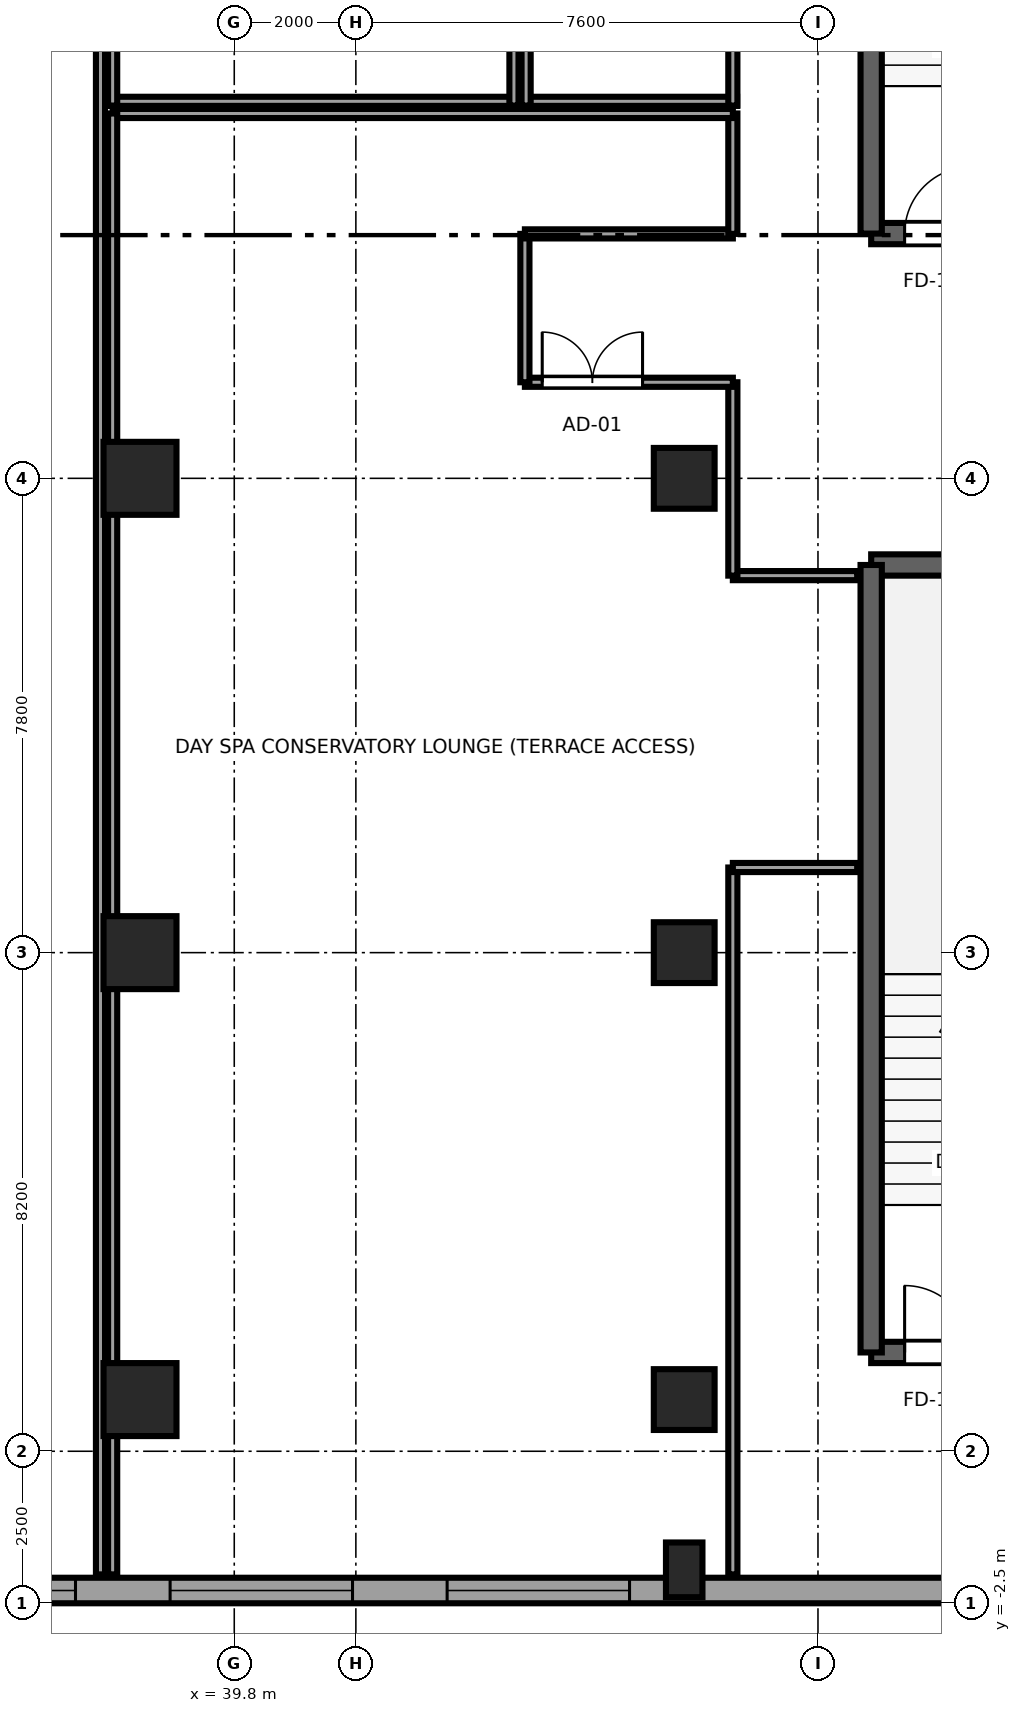
"""IFC4 building model, lengths in metres.
Left out: names, types, materials, properties, quantities, classifications, styles, units other than length and angle.
Written with IfcOpenShell. Run it as: python <this file> out.ifc"""

import sys

from ifc_helpers import new_model, si_unit, direction, frame, frame_2d, origin, origin_2d, place, context, subcontext, project, spatial, rectangle, extrude, source, transform, mapped, element, fill, save


model = new_model("IFC4")
c1 = context("Model", 3, precision=1e-05, world=origin(), true_north=direction((0.0, 1.0)))
c2 = subcontext(c1, "Body", "Model", "MODEL_VIEW")
j1 = project(units=[si_unit("LENGTHUNIT", "METRE"), si_unit("PLANEANGLEUNIT", "RADIAN")], contexts=[c1])
p1 = place(None, origin())
s1 = spatial("IfcSite", under=j1, at=p1, CompositionType="ELEMENT")
p2 = place(p1, origin())
s2 = spatial("IfcBuilding", under=s1, at=p2, CompositionType="ELEMENT")
p3 = place(p2, frame((0.0, 0.0, 26.8)))
s3 = spatial("IfcBuildingStorey", under=s2, at=p3, CompositionType="ELEMENT", Elevation=26.8)
p4 = place(p3, frame((50.275, 1.625, 0.0), z_axis=(0.0, 0.0, 1.0), x_axis=(1.0, 0.0, 0.0)))
e1 = element("IfcWall", 1, at=p4, inside=s3, PredefinedType="SHEAR", context=c2, shape_type="SweptSolid", body=[
    extrude(rectangle(XDim=5.0, YDim=0.35, at=frame_2d((2.5, 0.0))), origin(), (0.0, 0.0, 1.0), 5.2),
])
p5 = place(p4, frame((0.55, 0.0, 0.0)))
e2 = element("IfcOpeningElement", 2, at=p5, cuts=e1, PredefinedType="OPENING", context=c2, shape_type="SweptSolid", body=[
    extrude(rectangle(XDim=1.1, YDim=2.12, at=frame_2d((0.55, 1.06))), frame((0.0, 0.185, 0.0), z_axis=(0.0, -1.0, 0.0), x_axis=(1.0, 0.0, 0.0)), (0.0, 0.0, 1.0), 0.37),
])
p6 = place(p3, frame((55.275, 14.575, 0.0), z_axis=(0.0, 0.0, 1.0), x_axis=(-1.0, 0.0, 0.0)))
e3 = element("IfcWall", 3, at=p6, inside=s3, PredefinedType="SHEAR", context=c2, shape_type="SweptSolid", body=[
    extrude(rectangle(XDim=5.0, YDim=0.35, at=frame_2d((2.5, 0.0))), origin(), (0.0, 0.0, 1.0), 5.2),
])
p7 = place(p3, frame((50.275, 14.575, 0.0), z_axis=(0.0, 0.0, 1.0), x_axis=(0.0, -1.0, 0.0)))
e4 = element("IfcWall", 4, at=p7, inside=s3, PredefinedType="SHEAR", context=c2, shape_type="SweptSolid", body=[
    extrude(rectangle(XDim=12.95, YDim=0.35, at=frame_2d((6.475, 0.0))), origin(), (0.0, 0.0, 1.0), 5.2),
])
p8 = place(p3, frame((50.275, 20.025, 0.0), z_axis=(0.0, 0.0, 1.0), x_axis=(1.0, 0.0, 0.0)))
e5 = element("IfcWall", 5, at=p8, inside=s3, PredefinedType="SHEAR", context=c2, shape_type="SweptSolid", body=[
    extrude(rectangle(XDim=5.0, YDim=0.35, at=frame_2d((2.5, 0.0))), origin(), (0.0, 0.0, 1.0), 5.2),
])
p9 = place(p8, frame((0.55, 0.0, 0.0)))
e6 = element("IfcOpeningElement", 6, at=p9, cuts=e5, PredefinedType="OPENING", context=c2, shape_type="SweptSolid", body=[
    extrude(rectangle(XDim=1.1, YDim=2.12, at=frame_2d((0.55, 1.06))), frame((0.0, 0.185, 0.0), z_axis=(0.0, -1.0, 0.0), x_axis=(1.0, 0.0, 0.0)), (0.0, 0.0, 1.0), 0.37),
])
p10 = place(p3, frame((50.275, 32.975, 0.0), z_axis=(0.0, 0.0, 1.0), x_axis=(0.0, -1.0, 0.0)))
e7 = element("IfcWall", 7, at=p10, inside=s3, PredefinedType="SHEAR", context=c2, shape_type="SweptSolid", body=[
    extrude(rectangle(XDim=12.95, YDim=0.35, at=frame_2d((6.475, 0.0))), origin(), (0.0, 0.0, 1.0), 5.2),
])
m1 = source(origin(), c2, "Body", "SweptSolid", [
    extrude(rectangle(XDim=1.2, YDim=1.2, at=origin_2d()), origin(), (0.0, 0.0, 1.0), 5.2),
])
for number, where, z_axis, x_axis in (
    (8, (38.25, 0.85, 0.0), (0.0, 0.0, 1.0), (1.0, 0.0, 0.0)),
    (9, (38.25, 8.2, 0.0), (0.0, 0.0, 1.0), (1.0, 0.0, 0.0)),
    (10, (38.25, 16.0, 0.0), (0.0, 0.0, 1.0), (1.0, 0.0, 0.0)),
):
    element("IfcColumn", number, at=place(p3, frame(where, z_axis=z_axis, x_axis=x_axis)), inside=s3, PredefinedType="COLUMN", context=c2, shape_type="MappedRepresentation", body=[
        mapped(m1, transform((0.0, 0.0, 0.0), x_axis=(1.0, 0.0, 0.0), y_axis=(0.0, 1.0, 0.0), z_axis=(0.0, 0.0, 1.0), scale=1.0)),
    ])
m2 = source(origin(), c2, "Body", "SweptSolid", [
    extrude(rectangle(XDim=1.0, YDim=1.0, at=origin_2d()), origin(), (0.0, 0.0, 1.0), 5.2),
])
for number, where, z_axis, x_axis in (
    (11, (47.2, 0.85, 0.0), (0.0, 0.0, 1.0), (1.0, 0.0, 0.0)),
    (12, (47.2, 8.2, 0.0), (0.0, 0.0, 1.0), (1.0, 0.0, 0.0)),
    (13, (47.2, 16.0, 0.0), (0.0, 0.0, 1.0), (1.0, 0.0, 0.0)),
):
    element("IfcColumn", number, at=place(p3, frame(where, z_axis=z_axis, x_axis=x_axis)), inside=s3, PredefinedType="COLUMN", context=c2, shape_type="MappedRepresentation", body=[
        mapped(m2, transform((0.0, 0.0, 0.0), x_axis=(1.0, 0.0, 0.0), y_axis=(0.0, 1.0, 0.0), z_axis=(0.0, 0.0, 1.0), scale=1.0)),
    ])
m3 = source(origin(), c2, "Body", "SweptSolid", [
    extrude(rectangle(XDim=0.6, YDim=0.9, at=origin_2d()), origin(), (0.0, 0.0, 1.0), 5.2),
])
p11 = place(p3, frame((47.2, -1.95, 0.0), z_axis=(0.0, 0.0, 1.0), x_axis=(1.0, 0.0, 0.0)))
e14 = element("IfcColumn", 14, at=p11, inside=s3, PredefinedType="PILASTER", context=c2, shape_type="MappedRepresentation", body=[
    mapped(m3, transform((0.0, 0.0, 0.0), x_axis=(1.0, 0.0, 0.0), y_axis=(0.0, 1.0, 0.0), z_axis=(0.0, 0.0, 1.0), scale=1.0)),
])
p12 = place(p3, frame((-8.19, -2.29, 0.0), z_axis=(0.0, 0.0, 1.0), x_axis=(1.0, 0.0, 0.0)))
e15 = element("IfcWall", 15, at=p12, inside=s3, PredefinedType="SOLIDWALL", context=c2, shape_type="SweptSolid", body=[
    extrude(rectangle(XDim=64.98, YDim=0.42, at=frame_2d((32.49, 0.0))), origin(), (0.0, 0.0, 1.0), 4.94),
])
p13 = place(p12, frame((1.378, 0.0, 0.65)))
e16 = element("IfcOpeningElement", 16, at=p13, cuts=e15, PredefinedType="OPENING", context=c2, shape_type="SweptSolid", body=[
    extrude(rectangle(XDim=3.0, YDim=2.5, at=frame_2d((1.5, 1.25))), frame((0.0, 0.22, 0.0), z_axis=(0.0, -1.0, 0.0), x_axis=(1.0, 0.0, 0.0)), (0.0, 0.0, 1.0), 0.44),
])
p14 = place(p12, frame((4.884, 0.0, 0.65)))
e17 = element("IfcOpeningElement", 17, at=p14, cuts=e15, PredefinedType="OPENING", context=c2, shape_type="SweptSolid", body=[
    extrude(rectangle(XDim=3.0, YDim=2.5, at=frame_2d((1.5, 1.25))), frame((0.0, 0.22, 0.0), z_axis=(0.0, -1.0, 0.0), x_axis=(1.0, 0.0, 0.0)), (0.0, 0.0, 1.0), 0.44),
])
p15 = place(p12, frame((10.489, 0.0, 0.65)))
e18 = element("IfcOpeningElement", 18, at=p15, cuts=e15, PredefinedType="OPENING", context=c2, shape_type="SweptSolid", body=[
    extrude(rectangle(XDim=3.0, YDim=2.5, at=frame_2d((1.5, 1.25))), frame((0.0, 0.22, 0.0), z_axis=(0.0, -1.0, 0.0), x_axis=(1.0, 0.0, 0.0)), (0.0, 0.0, 1.0), 0.44),
])
p16 = place(p12, frame((19.601, 0.0, 0.65)))
e19 = element("IfcOpeningElement", 19, at=p16, cuts=e15, PredefinedType="OPENING", context=c2, shape_type="SweptSolid", body=[
    extrude(rectangle(XDim=3.0, YDim=2.5, at=frame_2d((1.5, 1.25))), frame((0.0, 0.22, 0.0), z_axis=(0.0, -1.0, 0.0), x_axis=(1.0, 0.0, 0.0)), (0.0, 0.0, 1.0), 0.44),
])
p17 = place(p12, frame((28.712, 0.0, 0.65)))
e20 = element("IfcOpeningElement", 20, at=p17, cuts=e15, PredefinedType="OPENING", context=c2, shape_type="SweptSolid", body=[
    extrude(rectangle(XDim=3.0, YDim=2.5, at=frame_2d((1.5, 1.25))), frame((0.0, 0.22, 0.0), z_axis=(0.0, -1.0, 0.0), x_axis=(1.0, 0.0, 0.0)), (0.0, 0.0, 1.0), 0.44),
])
p18 = place(p12, frame((32.718, 0.0, 0.65)))
e21 = element("IfcOpeningElement", 21, at=p18, cuts=e15, PredefinedType="OPENING", context=c2, shape_type="SweptSolid", body=[
    extrude(rectangle(XDim=3.0, YDim=2.5, at=frame_2d((1.5, 1.25))), frame((0.0, 0.22, 0.0), z_axis=(0.0, -1.0, 0.0), x_axis=(1.0, 0.0, 0.0)), (0.0, 0.0, 1.0), 0.44),
])
p19 = place(p12, frame((37.824, 0.0, 0.65)))
e22 = element("IfcOpeningElement", 22, at=p19, cuts=e15, PredefinedType="OPENING", context=c2, shape_type="SweptSolid", body=[
    extrude(rectangle(XDim=3.0, YDim=2.5, at=frame_2d((1.5, 1.25))), frame((0.0, 0.22, 0.0), z_axis=(0.0, -1.0, 0.0), x_axis=(1.0, 0.0, 0.0)), (0.0, 0.0, 1.0), 0.44),
])
p20 = place(p12, frame((42.379, 0.0, 0.65)))
e23 = element("IfcOpeningElement", 23, at=p20, cuts=e15, PredefinedType="OPENING", context=c2, shape_type="SweptSolid", body=[
    extrude(rectangle(XDim=3.0, YDim=2.5, at=frame_2d((1.5, 1.25))), frame((0.0, 0.22, 0.0), z_axis=(0.0, -1.0, 0.0), x_axis=(1.0, 0.0, 0.0)), (0.0, 0.0, 1.0), 0.44),
])
p21 = place(p12, frame((46.935, 0.0, 0.65)))
e24 = element("IfcOpeningElement", 24, at=p21, cuts=e15, PredefinedType="OPENING", context=c2, shape_type="SweptSolid", body=[
    extrude(rectangle(XDim=3.0, YDim=2.5, at=frame_2d((1.5, 1.25))), frame((0.0, 0.22, 0.0), z_axis=(0.0, -1.0, 0.0), x_axis=(1.0, 0.0, 0.0)), (0.0, 0.0, 1.0), 0.44),
])
p22 = place(p12, frame((51.491, 0.0, 0.65)))
e25 = element("IfcOpeningElement", 25, at=p22, cuts=e15, PredefinedType="OPENING", context=c2, shape_type="SweptSolid", body=[
    extrude(rectangle(XDim=3.0, YDim=2.5, at=frame_2d((1.5, 1.25))), frame((0.0, 0.22, 0.0), z_axis=(0.0, -1.0, 0.0), x_axis=(1.0, 0.0, 0.0)), (0.0, 0.0, 1.0), 0.44),
])
p23 = place(p12, frame((60.602, 0.0, 0.65)))
e26 = element("IfcOpeningElement", 26, at=p23, cuts=e15, PredefinedType="OPENING", context=c2, shape_type="SweptSolid", body=[
    extrude(rectangle(XDim=3.0, YDim=2.5, at=frame_2d((1.5, 1.25))), frame((0.0, 0.22, 0.0), z_axis=(0.0, -1.0, 0.0), x_axis=(1.0, 0.0, 0.0)), (0.0, 0.0, 1.0), 0.44),
])
p24 = place(p3, frame((37.6, -2.025, 0.0), z_axis=(0.0, 0.0, 1.0), x_axis=(0.0, 1.0, 0.0)))
e27 = element("IfcWall", 27, at=p24, inside=s3, PredefinedType="PARTITIONING", context=c2, shape_type="SweptSolid", body=[
    extrude(rectangle(XDim=29.375, YDim=0.15, at=frame_2d((14.688, 0.0))), origin(), (0.0, 0.0, 1.0), 4.94),
])
p25 = place(p3, frame((48.0, -2.025, 0.0), z_axis=(0.0, 0.0, 1.0), x_axis=(0.0, 1.0, 0.0)))
e28 = element("IfcWall", 28, at=p25, inside=s3, PredefinedType="PARTITIONING", context=c2, shape_type="SweptSolid", body=[
    extrude(rectangle(XDim=11.625, YDim=0.15, at=frame_2d((5.812, 0.0))), origin(), (0.0, 0.0, 1.0), 4.94),
])
for number, where, z_axis, x_axis in (
    (29, (48.0, 9.6, 0.0), (0.0, 0.0, 1.0), (1.0, 0.0, 0.0)),
    (30, (48.0, 14.4, 0.0), (0.0, 0.0, 1.0), (1.0, 0.0, 0.0)),
):
    element("IfcWall", number, at=place(p3, frame(where, z_axis=z_axis, x_axis=x_axis)), inside=s3, PredefinedType="PARTITIONING", context=c2, shape_type="SweptSolid", body=[
        extrude(rectangle(XDim=2.045, YDim=0.15, at=frame_2d((1.022, 0.0))), origin(), (0.0, 0.0, 1.0), 4.94),
    ])
p26 = place(p3, frame((48.0, 14.4, 0.0), z_axis=(0.0, 0.0, 1.0), x_axis=(0.0, 1.0, 0.0)))
e31 = element("IfcWall", 31, at=p26, inside=s3, PredefinedType="PARTITIONING", context=c2, shape_type="SweptSolid", body=[
    extrude(rectangle(XDim=3.18, YDim=0.15, at=frame_2d((1.59, 0.0))), origin(), (0.0, 0.0, 1.0), 4.94),
])
p27 = place(p3, frame((44.58, 17.58, 0.0), z_axis=(0.0, 0.0, 1.0), x_axis=(1.0, 0.0, 0.0)))
e32 = element("IfcWall", 32, at=p27, inside=s3, PredefinedType="PARTITIONING", context=c2, shape_type="SweptSolid", body=[
    extrude(rectangle(XDim=3.42, YDim=0.15, at=frame_2d((1.71, 0.0))), origin(), (0.0, 0.0, 1.0), 4.94),
])
p28 = place(p27, frame((0.285, 0.0, 0.0)))
e33 = element("IfcOpeningElement", 33, at=p28, cuts=e32, PredefinedType="OPENING", context=c2, shape_type="SweptSolid", body=[
    extrude(rectangle(XDim=1.65, YDim=2.15, at=frame_2d((0.825, 1.075))), frame((0.0, 0.085, 0.0), z_axis=(0.0, -1.0, 0.0), x_axis=(1.0, 0.0, 0.0)), (0.0, 0.0, 1.0), 0.17),
])
p29 = place(p3, frame((44.58, 17.58, 0.0), z_axis=(0.0, 0.0, 1.0), x_axis=(0.0, 1.0, 0.0)))
e34 = element("IfcWall", 34, at=p29, inside=s3, PredefinedType="PARTITIONING", context=c2, shape_type="SweptSolid", body=[
    extrude(rectangle(XDim=2.44, YDim=0.15, at=frame_2d((1.22, 0.0))), origin(), (0.0, 0.0, 1.0), 4.94),
])
p30 = place(p3, frame((44.58, 20.02, 0.0), z_axis=(0.0, 0.0, 1.0), x_axis=(1.0, 0.0, 0.0)))
e35 = element("IfcWall", 35, at=p30, inside=s3, PredefinedType="PARTITIONING", context=c2, shape_type="SweptSolid", body=[
    extrude(rectangle(XDim=3.42, YDim=0.15, at=frame_2d((1.71, 0.0))), origin(), (0.0, 0.0, 1.0), 4.94),
])
p31 = place(p3, frame((48.0, 20.02, 0.0), z_axis=(0.0, 0.0, 1.0), x_axis=(0.0, 1.0, 0.0)))
e36 = element("IfcWall", 36, at=p31, inside=s3, PredefinedType="PARTITIONING", context=c2, shape_type="SweptSolid", body=[
    extrude(rectangle(XDim=1.98, YDim=0.15, at=frame_2d((0.99, 0.0))), origin(), (0.0, 0.0, 1.0), 4.94),
])
p32 = place(p3, frame((37.8, 22.0, 0.0), z_axis=(0.0, 0.0, 1.0), x_axis=(1.0, 0.0, 0.0)))
e37 = element("IfcWall", 37, at=p32, inside=s3, PredefinedType="PARTITIONING", context=c2, shape_type="SweptSolid", body=[
    extrude(rectangle(XDim=10.2, YDim=0.15, at=frame_2d((5.1, 0.0))), origin(), (0.0, 0.0, 1.0), 4.94),
])
p33 = place(p3, frame((37.8, -2.025, 0.0), z_axis=(0.0, 0.0, 1.0), x_axis=(0.0, 1.0, 0.0)))
e38 = element("IfcWall", 38, at=p33, inside=s3, PredefinedType="PARTITIONING", context=c2, shape_type="SweptSolid", body=[
    extrude(rectangle(XDim=24.025, YDim=0.15, at=frame_2d((12.012, 0.0))), origin(), (0.0, 0.0, 1.0), 4.94),
])
p34 = place(p3, frame((37.73, 22.2, 0.0), z_axis=(0.0, 0.0, 1.0), x_axis=(1.0, 0.0, 0.0)))
e39 = element("IfcWall", 39, at=p34, inside=s3, PredefinedType="PARTITIONING", context=c2, shape_type="SweptSolid", body=[
    extrude(rectangle(XDim=6.74, YDim=0.15, at=frame_2d((3.37, 0.0))), origin(), (0.0, 0.0, 1.0), 4.94),
])
for number, where, z_axis, x_axis in (
    (40, (37.8, 22.13, 0.0), (0.0, 0.0, 1.0), (0.0, 1.0, 0.0)),
    (41, (44.4, 22.13, 0.0), (0.0, 0.0, 1.0), (0.0, 1.0, 0.0)),
):
    element("IfcWall", number, at=place(p3, frame(where, z_axis=z_axis, x_axis=x_axis)), inside=s3, PredefinedType="PARTITIONING", context=c2, shape_type="SweptSolid", body=[
        extrude(rectangle(XDim=5.29, YDim=0.15, at=frame_2d((2.645, 0.0))), origin(), (0.0, 0.0, 1.0), 4.94),
    ])
p35 = place(p3, frame((44.53, 22.2, 0.0), z_axis=(0.0, 0.0, 1.0), x_axis=(1.0, 0.0, 0.0)))
e42 = element("IfcWall", 42, at=p35, inside=s3, PredefinedType="PARTITIONING", context=c2, shape_type="SweptSolid", body=[
    extrude(rectangle(XDim=3.54, YDim=0.15, at=frame_2d((1.77, 0.0))), origin(), (0.0, 0.0, 1.0), 4.94),
])
for number, where, z_axis, x_axis in (
    (43, (44.6, 22.13, 0.0), (0.0, 0.0, 1.0), (0.0, 1.0, 0.0)),
    (44, (48.0, 22.13, 0.0), (0.0, 0.0, 1.0), (0.0, 1.0, 0.0)),
):
    element("IfcWall", number, at=place(p3, frame(where, z_axis=z_axis, x_axis=x_axis)), inside=s3, PredefinedType="PARTITIONING", context=c2, shape_type="SweptSolid", body=[
        extrude(rectangle(XDim=5.29, YDim=0.15, at=frame_2d((2.645, 0.0))), origin(), (0.0, 0.0, 1.0), 4.94),
    ])
m4 = source(origin(), c2, "Body", "SweptSolid", [
    extrude(rectangle(XDim=3.0, YDim=2.5, at=frame_2d((1.5, 1.25))), frame((0.0, 0.09, 0.0), z_axis=(0.0, -1.0, 0.0), x_axis=(1.0, 0.0, 0.0)), (0.0, 0.0, 1.0), 0.06),
])
p36 = place(p20, origin())
e45 = element("IfcWindow", 45, at=p36, inside=s3, PartitioningType="TRIPLE_PANEL_HORIZONTAL", PredefinedType="WINDOW", context=c2, shape_type="MappedRepresentation", body=[
    mapped(m4, transform((0.0, 0.0, 0.0), x_axis=(1.0, 0.0, 0.0), y_axis=(0.0, 1.0, 0.0), z_axis=(0.0, 0.0, 1.0), scale=1.0)),
])
fill(e23, e45)
p37 = place(p21, origin())
e46 = element("IfcWindow", 46, at=p37, inside=s3, PartitioningType="TRIPLE_PANEL_HORIZONTAL", PredefinedType="WINDOW", context=c2, shape_type="MappedRepresentation", body=[
    mapped(m4, transform((0.0, 0.0, 0.0), x_axis=(1.0, 0.0, 0.0), y_axis=(0.0, 1.0, 0.0), z_axis=(0.0, 0.0, 1.0), scale=1.0)),
])
fill(e24, e46)
p38 = place(p22, origin())
e47 = element("IfcWindow", 47, at=p38, inside=s3, PartitioningType="TRIPLE_PANEL_HORIZONTAL", PredefinedType="WINDOW", context=c2, shape_type="MappedRepresentation", body=[
    mapped(m4, transform((0.0, 0.0, 0.0), x_axis=(1.0, 0.0, 0.0), y_axis=(0.0, 1.0, 0.0), z_axis=(0.0, 0.0, 1.0), scale=1.0)),
])
fill(e25, e47)
m5 = source(origin(), c2, "Body", "SweptSolid", [
    extrude(rectangle(XDim=1.1, YDim=2.12, at=frame_2d((0.55, 1.06))), frame((0.0, 0.025, 0.0), z_axis=(0.0, -1.0, 0.0), x_axis=(1.0, 0.0, 0.0)), (0.0, 0.0, 1.0), 0.05),
])
p39 = place(p5, origin())
e48 = element("IfcDoor", 48, at=p39, inside=s3, OperationType="SINGLE_SWING_LEFT", PredefinedType="DOOR", context=c2, shape_type="MappedRepresentation", body=[
    mapped(m5, transform((0.0, 0.0, 0.0), x_axis=(1.0, 0.0, 0.0), y_axis=(0.0, 1.0, 0.0), z_axis=(0.0, 0.0, 1.0), scale=1.0)),
])
fill(e2, e48)
p40 = place(p9, origin())
e49 = element("IfcDoor", 49, at=p40, inside=s3, OperationType="SINGLE_SWING_RIGHT", PredefinedType="DOOR", context=c2, shape_type="MappedRepresentation", body=[
    mapped(m5, transform((0.0, 0.0, 0.0), x_axis=(1.0, 0.0, 0.0), y_axis=(0.0, 1.0, 0.0), z_axis=(0.0, 0.0, 1.0), scale=1.0)),
])
fill(e6, e49)
m6 = source(origin(), c2, "Body", "SweptSolid", [
    extrude(rectangle(XDim=1.65, YDim=2.15, at=frame_2d((0.825, 1.075))), frame((0.0, 0.025, 0.0), z_axis=(0.0, -1.0, 0.0), x_axis=(1.0, 0.0, 0.0)), (0.0, 0.0, 1.0), 0.05),
])
p41 = place(p28, origin())
e50 = element("IfcDoor", 50, at=p41, inside=s3, OperationType="DOUBLE_DOOR_SINGLE_SWING", PredefinedType="DOOR", context=c2, shape_type="MappedRepresentation", body=[
    mapped(m6, transform((0.0, 0.0, 0.0), x_axis=(1.0, 0.0, 0.0), y_axis=(0.0, 1.0, 0.0), z_axis=(0.0, 0.0, 1.0), scale=1.0)),
])
fill(e33, e50)
save(model, sys.argv[1])
